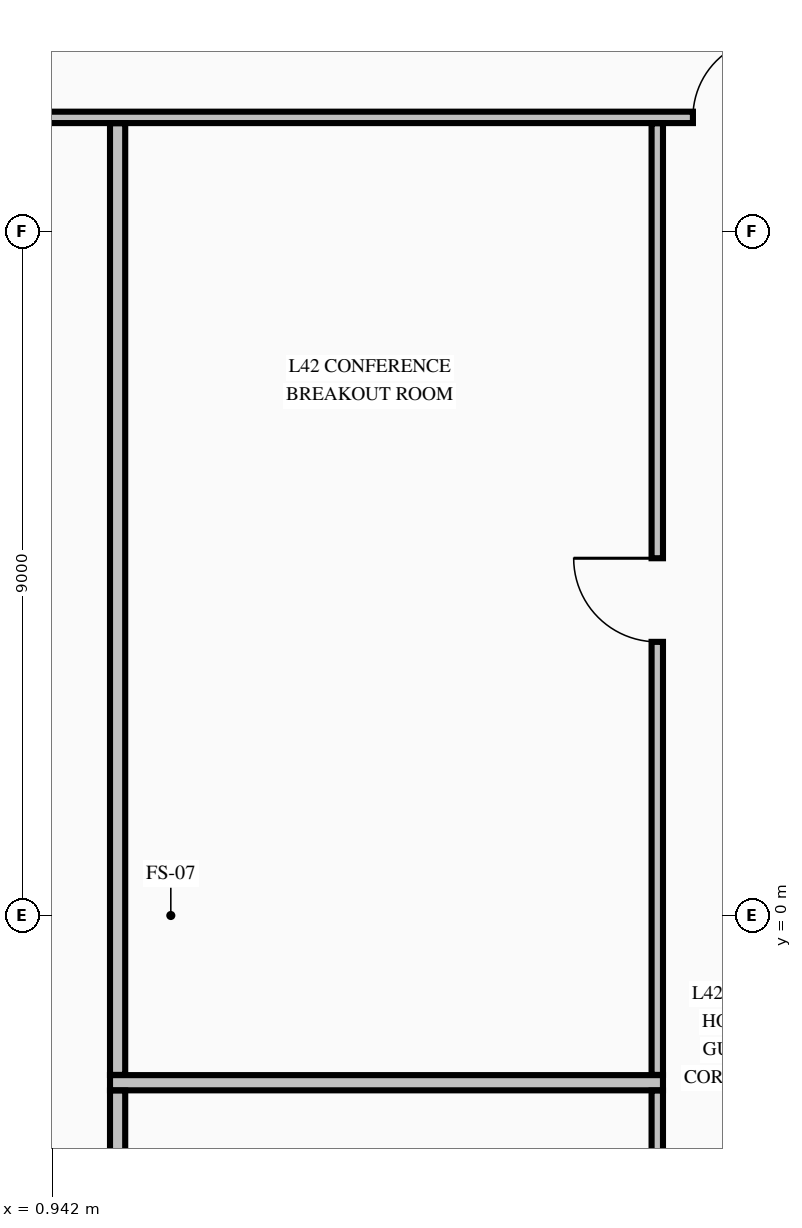
"""IFC4 building model, lengths in metres.
Left out: names, types, materials, properties, quantities, classifications, styles, units other than length and angle.
Written with IfcOpenShell. Run it as: python <this file> out.ifc"""

import sys

from ifc_helpers import new_model, si_unit, direction, frame, frame_2d, origin, place, context, subcontext, project, spatial, rectangle, extrude, element, fill, save


model = new_model("IFC4")
c1 = context("Model", 3, precision=1e-05, world=origin(), true_north=direction((0.0, 1.0)))
c2 = subcontext(c1, "Body", "Model", "MODEL_VIEW")
j1 = project(units=[si_unit("LENGTHUNIT", "METRE"), si_unit("PLANEANGLEUNIT", "RADIAN")], contexts=[c1])
p1 = place(None, origin())
s1 = spatial("IfcSite", under=j1, at=p1, CompositionType="ELEMENT")
p2 = place(p1, origin())
s2 = spatial("IfcBuilding", under=s1, at=p2, CompositionType="ELEMENT")
p3 = place(p2, frame((0.0, 0.0, 166.06)))
s3 = spatial("IfcBuildingStorey", under=s2, at=p3, CompositionType="ELEMENT", Elevation=166.06)
p4 = place(p3, frame((1.7, -2.2, 0.0), z_axis=(0.0, 0.0, 1.0), x_axis=(1.0, 0.0, 0.0)))
e1 = element("IfcWall", 1, at=p4, inside=s3, PredefinedType="PARTITIONING", context=c2, shape_type="SweptSolid", body=[
    extrude(rectangle(XDim=7.275, YDim=0.2, at=frame_2d((3.638, 0.0))), origin(), (0.0, 0.0, 1.0), 3.15),
])
p5 = place(p3, frame((-10.569, 10.5, 0.0), z_axis=(0.0, 0.0, 1.0), x_axis=(1.0, 0.0, 0.0)))
e2 = element("IfcWall", 2, at=p5, inside=s3, PredefinedType="PARTITIONING", context=c2, shape_type="SweptSolid", body=[
    extrude(rectangle(XDim=21.138, YDim=0.15, at=frame_2d((10.569, 0.0))), origin(), (0.0, 0.0, 1.0), 3.15),
])
p6 = place(p5, frame((0.15, 0.0, 0.0)))
e3 = element("IfcOpeningElement", 3, at=p6, cuts=e2, PredefinedType="OPENING", context=c2, shape_type="SweptSolid", body=[
    extrude(rectangle(XDim=1.05, YDim=2.15, at=frame_2d((0.525, 1.075))), frame((0.0, 0.085, 0.0), z_axis=(0.0, -1.0, 0.0), x_axis=(1.0, 0.0, 0.0)), (0.0, 0.0, 1.0), 0.17),
])
p7 = place(p5, frame((19.938, 0.0, 0.0)))
e4 = element("IfcOpeningElement", 4, at=p7, cuts=e2, PredefinedType="OPENING", context=c2, shape_type="SweptSolid", body=[
    extrude(rectangle(XDim=1.05, YDim=2.15, at=frame_2d((0.525, 1.075))), frame((0.0, 0.085, 0.0), z_axis=(0.0, -1.0, 0.0), x_axis=(1.0, 0.0, 0.0)), (0.0, 0.0, 1.0), 0.17),
])
p8 = place(p3, frame((1.8, -3.297, 0.0), z_axis=(0.0, 0.0, 1.0), x_axis=(0.0, 1.0, 0.0)))
e5 = element("IfcWall", 5, at=p8, inside=s3, PredefinedType="PARTITIONING", context=c2, shape_type="SweptSolid", body=[
    extrude(rectangle(XDim=0.994, YDim=0.2, at=frame_2d((0.497, 0.0))), origin(), (0.0, 0.0, 1.0), 3.15),
])
p9 = place(p3, frame((1.8, -2.097, 0.0), z_axis=(0.0, 0.0, 1.0), x_axis=(0.0, 1.0, 0.0)))
e6 = element("IfcWall", 6, at=p9, inside=s3, PredefinedType="PARTITIONING", context=c2, shape_type="SweptSolid", body=[
    extrude(rectangle(XDim=12.519, YDim=0.2, at=frame_2d((6.26, 0.0))), origin(), (0.0, 0.0, 1.0), 3.15),
])
p10 = place(p3, frame((8.9, -5.097, 0.0), z_axis=(0.0, 0.0, 1.0), x_axis=(0.0, 1.0, 0.0)))
e7 = element("IfcWall", 7, at=p10, inside=s3, PredefinedType="PARTITIONING", context=c2, shape_type="SweptSolid", body=[
    extrude(rectangle(XDim=2.794, YDim=0.15, at=frame_2d((1.397, 0.0))), origin(), (0.0, 0.0, 1.0), 3.15),
])
p11 = place(p10, frame((0.922, 0.0, 0.0)))
e8 = element("IfcOpeningElement", 8, at=p11, cuts=e7, PredefinedType="OPENING", context=c2, shape_type="SweptSolid", body=[
    extrude(rectangle(XDim=0.95, YDim=2.15, at=frame_2d((0.475, 1.075))), frame((0.0, 0.085, 0.0), z_axis=(0.0, -1.0, 0.0), x_axis=(1.0, 0.0, 0.0)), (0.0, 0.0, 1.0), 0.17),
])
p12 = place(p3, frame((8.9, -2.097, 0.0), z_axis=(0.0, 0.0, 1.0), x_axis=(0.0, 1.0, 0.0)))
e9 = element("IfcWall", 9, at=p12, inside=s3, PredefinedType="PARTITIONING", context=c2, shape_type="SweptSolid", body=[
    extrude(rectangle(XDim=12.519, YDim=0.15, at=frame_2d((6.26, 0.0))), origin(), (0.0, 0.0, 1.0), 3.15),
])
p13 = place(p12, frame((5.697, 0.0, 0.0)))
e10 = element("IfcOpeningElement", 10, at=p13, cuts=e9, PredefinedType="OPENING", context=c2, shape_type="SweptSolid", body=[
    extrude(rectangle(XDim=1.1, YDim=2.15, at=frame_2d((0.55, 1.075))), frame((0.0, 0.085, 0.0), z_axis=(0.0, -1.0, 0.0), x_axis=(1.0, 0.0, 0.0)), (0.0, 0.0, 1.0), 0.17),
])
p14 = place(p7, origin())
e11 = element("IfcDoor", 11, at=p14, inside=s3, OperationType="SINGLE_SWING_RIGHT", PredefinedType="DOOR", context=c2, shape_type="SweptSolid", body=[
    extrude(rectangle(XDim=1.05, YDim=2.15, at=frame_2d((0.525, 1.075))), frame((0.0, 0.025, 0.0), z_axis=(0.0, -1.0, 0.0), x_axis=(1.0, 0.0, 0.0)), (0.0, 0.0, 1.0), 0.05),
])
fill(e4, e11)
p15 = place(p13, origin())
e12 = element("IfcDoor", 12, at=p15, inside=s3, OperationType="SINGLE_SWING_RIGHT", PredefinedType="DOOR", context=c2, shape_type="SweptSolid", body=[
    extrude(rectangle(XDim=1.1, YDim=2.15, at=frame_2d((0.55, 1.075))), frame((0.0, 0.025, 0.0), z_axis=(0.0, -1.0, 0.0), x_axis=(1.0, 0.0, 0.0)), (0.0, 0.0, 1.0), 0.05),
])
fill(e10, e12)
save(model, sys.argv[1])
